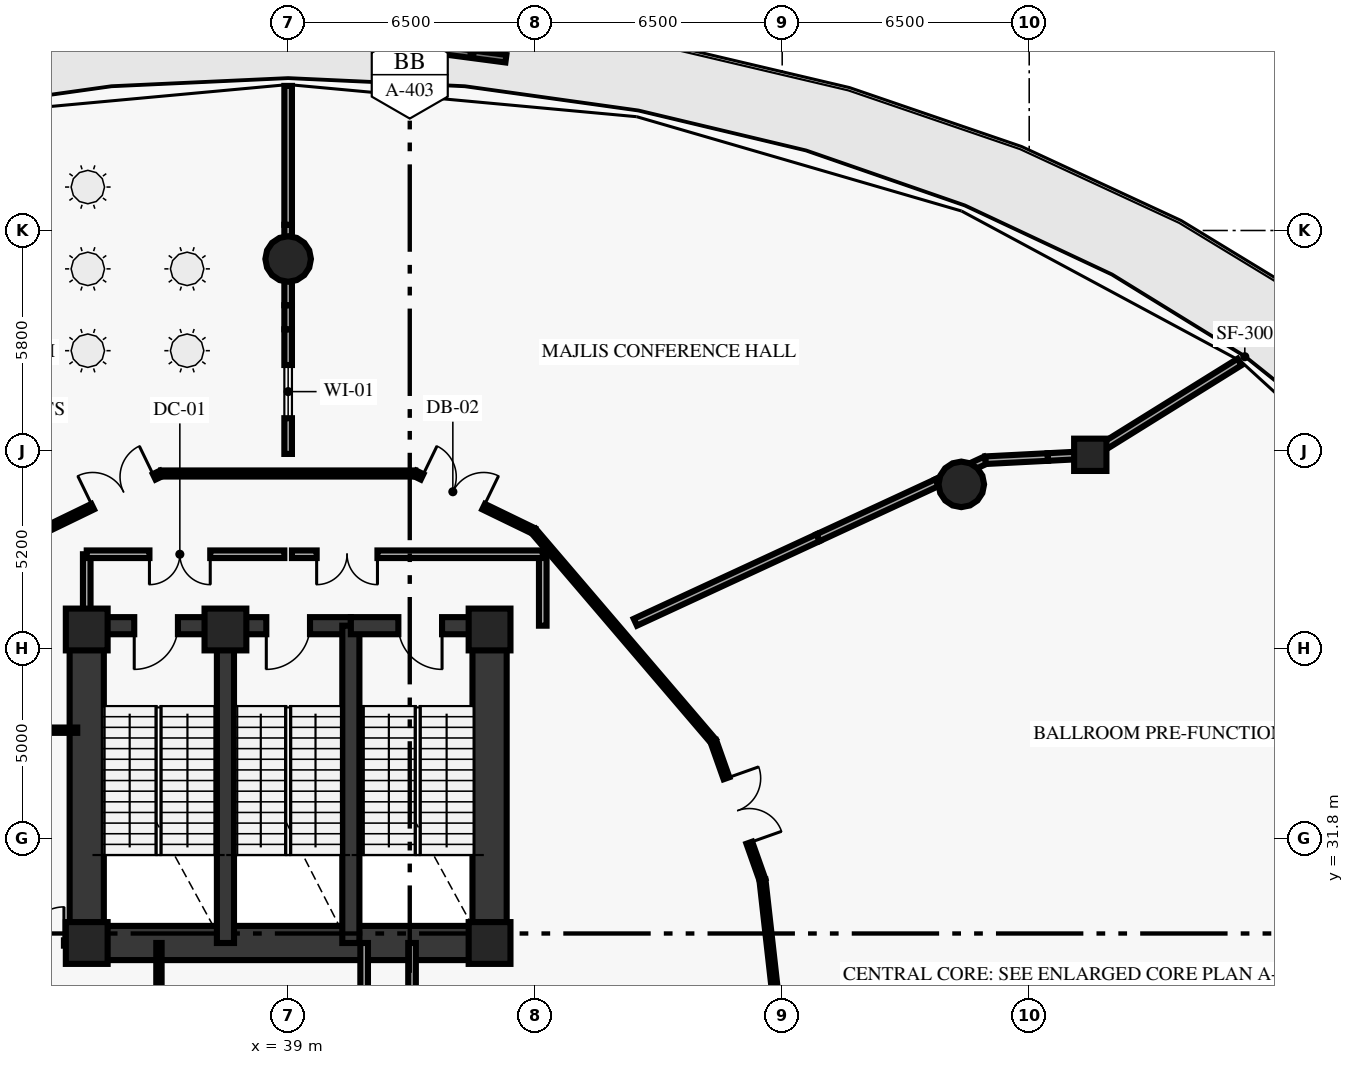
"""IFC4 building model, lengths in metres.
Left out: names, types, materials, properties, quantities, classifications, styles, units other than length and angle.
Written with IfcOpenShell. Run it as: python <this file> out.ifc"""

import sys

from ifc_helpers import new_model, si_unit, direction, frame, frame_2d, origin, origin_2d, place, context, subcontext, project, spatial, rectangle, circle, extrude, element, fill, save


model = new_model("IFC4")
c1 = context("Model", 3, precision=1e-05, world=origin(), true_north=direction((0.0, 1.0)))
c2 = subcontext(c1, "Body", "Model", "MODEL_VIEW")
j1 = project(units=[si_unit("LENGTHUNIT", "METRE"), si_unit("PLANEANGLEUNIT", "RADIAN")], contexts=[c1])
p1 = place(None, origin())
s1 = spatial("IfcSite", under=j1, at=p1, CompositionType="ELEMENT")
p2 = place(p1, origin())
s2 = spatial("IfcBuilding", under=s1, at=p2, CompositionType="ELEMENT")
p3 = place(p2, frame((0.0, 0.0, 11.0)))
s3 = spatial("IfcBuildingStorey", under=s2, at=p3, CompositionType="ELEMENT", Elevation=11.0)
for number, where, z_axis, x_axis in (
    (1, (44.3, 29.05, 0.0), (0.0, 0.0, 1.0), (1.0, 0.0, 0.0)),
    (2, (44.3, 37.3, 0.0), (0.0, 0.0, 1.0), (1.0, 0.0, 0.0)),
    (3, (37.35, 37.3, 0.0), (0.0, 0.0, 1.0), (1.0, 0.0, 0.0)),
    (4, (33.7, 37.3, 0.0), (0.0, 0.0, 1.0), (1.0, 0.0, 0.0)),
    (5, (33.7, 29.05, 0.0), (0.0, 0.0, 1.0), (1.0, 0.0, 0.0)),
):
    element("IfcColumn", number, at=place(p3, frame(where, z_axis=z_axis, x_axis=x_axis)), inside=s3, PredefinedType="PILASTER", context=c2, shape_type="SweptSolid", body=[
        extrude(rectangle(XDim=1.1, YDim=1.1, at=origin_2d()), origin(), (0.0, 0.0, 1.0), 4.7),
    ])
for number, where, z_axis, x_axis in (
    (6, (56.713, 41.119, 0.0), (0.0, 0.0, 1.0), (1.0, 0.0, 0.0)),
    (7, (39.0, 47.05, 0.0), (0.0, 0.0, 1.0), (1.0, 0.0, 0.0)),
):
    element("IfcColumn", number, at=place(p3, frame(where, z_axis=z_axis, x_axis=x_axis)), inside=s3, PredefinedType="COLUMN", context=c2, shape_type="SweptSolid", body=[
        extrude(circle(Radius=0.6, at=origin_2d()), origin(), (0.0, 0.0, 1.0), 4.7),
    ])
p4 = place(p3, frame((60.107, 41.897, 0.0), z_axis=(0.0, 0.0, 1.0), x_axis=(1.0, 0.0, 0.0)))
e8 = element("IfcColumn", 8, at=p4, inside=s3, PredefinedType="COLUMN", context=c2, shape_type="SweptSolid", body=[
    extrude(rectangle(XDim=0.85, YDim=0.85, at=origin_2d()), origin(), (0.0, 0.0, 1.0), 4.7),
])
for number, where, z_axis, x_axis in (
    (9, (33.7, 29.05, 0.0), (0.0, 0.0, 1.0), (0.0, 1.0, 0.0)),
    (10, (44.3, 29.05, 0.0), (0.0, 0.0, 1.0), (0.0, 1.0, 0.0)),
):
    element("IfcWall", number, at=place(p3, frame(where, z_axis=z_axis, x_axis=x_axis)), inside=s3, PredefinedType="SHEAR", context=c2, shape_type="SweptSolid", body=[
        extrude(rectangle(XDim=8.35, YDim=0.9, at=frame_2d((4.175, 0.0))), origin(), (0.0, 0.0, 1.0), 4.7),
    ])
p5 = place(p3, frame((33.7, 29.05, 0.0), z_axis=(0.0, 0.0, 1.0), x_axis=(1.0, 0.0, 0.0)))
e11 = element("IfcWall", 11, at=p5, inside=s3, PredefinedType="SHEAR", context=c2, shape_type="SweptSolid", body=[
    extrude(rectangle(XDim=10.6, YDim=0.9, at=frame_2d((5.3, 0.0))), origin(), (0.0, 0.0, 1.0), 4.7),
])
p6 = place(p3, frame((42.945, 52.556, 0.0), z_axis=(0.0, 0.0, 1.0), x_axis=(0.99145383396, -0.130458020554, 0.0)))
e12 = element("IfcWall", 12, at=p6, inside=s3, PredefinedType="ELEMENTEDWALL", context=c2, shape_type="SweptSolid", body=[
    extrude(rectangle(XDim=1.8, YDim=0.2, at=frame_2d((0.9, 0.0))), origin(), (0.0, 0.0, 1.0), 0.65),
])
p7 = place(p3, frame((37.35, 37.4, 0.0), z_axis=(0.0, 0.0, 1.0), x_axis=(-1.0, 0.0, 0.0)))
e13 = element("IfcWall", 13, at=p7, inside=s3, PredefinedType="SHEAR", context=c2, shape_type="SweptSolid", body=[
    extrude(rectangle(XDim=3.65, YDim=0.45, at=frame_2d((1.825, 0.0))), origin(), (0.0, 0.0, 1.0), 4.7),
])
p8 = place(p7, frame((1.25, 0.0, 0.0)))
e14 = element("IfcOpeningElement", 14, at=p8, cuts=e13, PredefinedType="OPENING", context=c2, shape_type="SweptSolid", body=[
    extrude(rectangle(XDim=1.15, YDim=2.15, at=frame_2d((0.575, 1.075))), frame((0.0, 0.235, 0.0), z_axis=(0.0, -1.0, 0.0), x_axis=(1.0, 0.0, 0.0)), (0.0, 0.0, 1.0), 0.47),
])
p9 = place(p3, frame((37.35, 29.05, 0.0), z_axis=(0.0, 0.0, 1.0), x_axis=(0.0, 1.0, 0.0)))
e15 = element("IfcWall", 15, at=p9, inside=s3, PredefinedType="SHEAR", context=c2, shape_type="SweptSolid", body=[
    extrude(rectangle(XDim=8.35, YDim=0.45, at=frame_2d((4.175, 0.0))), origin(), (0.0, 0.0, 1.0), 4.7),
])
p10 = place(p3, frame((40.65, 37.4, 0.0), z_axis=(0.0, 0.0, 1.0), x_axis=(-1.0, 0.0, 0.0)))
e16 = element("IfcWall", 16, at=p10, inside=s3, PredefinedType="SHEAR", context=c2, shape_type="SweptSolid", body=[
    extrude(rectangle(XDim=3.3, YDim=0.45, at=frame_2d((1.65, 0.0))), origin(), (0.0, 0.0, 1.0), 4.7),
])
p11 = place(p10, frame((1.075, 0.0, 0.0)))
e17 = element("IfcOpeningElement", 17, at=p11, cuts=e16, PredefinedType="OPENING", context=c2, shape_type="SweptSolid", body=[
    extrude(rectangle(XDim=1.15, YDim=2.15, at=frame_2d((0.575, 1.075))), frame((0.0, 0.235, 0.0), z_axis=(0.0, -1.0, 0.0), x_axis=(1.0, 0.0, 0.0)), (0.0, 0.0, 1.0), 0.47),
])
p12 = place(p3, frame((40.65, 29.05, 0.0), z_axis=(0.0, 0.0, 1.0), x_axis=(0.0, 1.0, 0.0)))
e18 = element("IfcWall", 18, at=p12, inside=s3, PredefinedType="SHEAR", context=c2, shape_type="SweptSolid", body=[
    extrude(rectangle(XDim=8.35, YDim=0.45, at=frame_2d((4.175, 0.0))), origin(), (0.0, 0.0, 1.0), 4.7),
])
p13 = place(p3, frame((44.3, 37.4, 0.0), z_axis=(0.0, 0.0, 1.0), x_axis=(-1.0, 0.0, 0.0)))
e19 = element("IfcWall", 19, at=p13, inside=s3, PredefinedType="SHEAR", context=c2, shape_type="SweptSolid", body=[
    extrude(rectangle(XDim=3.65, YDim=0.45, at=frame_2d((1.825, 0.0))), origin(), (0.0, 0.0, 1.0), 4.7),
])
p14 = place(p13, frame((1.25, 0.0, 0.0)))
e20 = element("IfcOpeningElement", 20, at=p14, cuts=e19, PredefinedType="OPENING", context=c2, shape_type="SweptSolid", body=[
    extrude(rectangle(XDim=1.15, YDim=2.15, at=frame_2d((0.575, 1.075))), frame((0.0, 0.235, 0.0), z_axis=(0.0, -1.0, 0.0), x_axis=(1.0, 0.0, 0.0)), (0.0, 0.0, 1.0), 0.47),
])
for number, where, z_axis, x_axis in (
    (21, (33.7, 37.4, 0.0), (0.0, 0.0, 1.0), (0.0, 1.0, 0.0)),
    (22, (45.7, 37.4, 0.0), (0.0, 0.0, 1.0), (0.0, 1.0, 0.0)),
):
    element("IfcWall", number, at=place(p3, frame(where, z_axis=z_axis, x_axis=x_axis)), inside=s3, PredefinedType="SOLIDWALL", context=c2, shape_type="SweptSolid", body=[
        extrude(rectangle(XDim=1.88, YDim=0.2, at=frame_2d((0.94, 0.0))), origin(), (0.0, 0.0, 1.0), 4.7),
    ])
p15 = place(p3, frame((38.9, 39.28, 0.0), z_axis=(0.0, 0.0, 1.0), x_axis=(-1.0, 0.0, 0.0)))
e23 = element("IfcWall", 23, at=p15, inside=s3, PredefinedType="SOLIDWALL", context=c2, shape_type="SweptSolid", body=[
    extrude(rectangle(XDim=5.2, YDim=0.2, at=frame_2d((2.6, 0.0))), origin(), (0.0, 0.0, 1.0), 4.7),
])
p16 = place(p15, frame((1.95, 0.0, 0.0)))
e24 = element("IfcOpeningElement", 24, at=p16, cuts=e23, PredefinedType="OPENING", context=c2, shape_type="SweptSolid", body=[
    extrude(rectangle(XDim=1.6, YDim=2.2, at=frame_2d((0.8, 1.1))), frame((0.0, 0.11, 0.0), z_axis=(0.0, -1.0, 0.0), x_axis=(1.0, 0.0, 0.0)), (0.0, 0.0, 1.0), 0.22),
])
p17 = place(p3, frame((45.7, 39.28, 0.0), z_axis=(0.0, 0.0, 1.0), x_axis=(-1.0, 0.0, 0.0)))
e25 = element("IfcWall", 25, at=p17, inside=s3, PredefinedType="SOLIDWALL", context=c2, shape_type="SweptSolid", body=[
    extrude(rectangle(XDim=6.6, YDim=0.2, at=frame_2d((3.3, 0.0))), origin(), (0.0, 0.0, 1.0), 4.7),
])
p18 = place(p17, frame((4.35, 0.0, 0.0)))
e26 = element("IfcOpeningElement", 26, at=p18, cuts=e25, PredefinedType="OPENING", context=c2, shape_type="SweptSolid", body=[
    extrude(rectangle(XDim=1.6, YDim=2.2, at=frame_2d((0.8, 1.1))), frame((0.0, 0.11, 0.0), z_axis=(0.0, -1.0, 0.0), x_axis=(1.0, 0.0, 0.0)), (0.0, 0.0, 1.0), 0.22),
])
p19 = place(p3, frame((35.6, 27.28, 0.0), z_axis=(0.0, 0.0, 1.0), x_axis=(0.0, 1.0, 0.0)))
e27 = element("IfcWall", 27, at=p19, inside=s3, PredefinedType="PARTITIONING", context=c2, shape_type="SweptSolid", body=[
    extrude(rectangle(XDim=1.77, YDim=0.14, at=frame_2d((0.885, 0.0))), origin(), (0.0, 0.0, 1.0), 4.7),
])
for number, where, z_axis, x_axis in (
    (28, (41.0, 27.28, 0.0), (0.0, 0.0, 1.0), (0.0, 1.0, 0.0)),
    (29, (42.26, 27.28, 0.0), (0.0, 0.0, 1.0), (0.0, 1.0, 0.0)),
):
    element("IfcWall", number, at=place(p3, frame(where, z_axis=z_axis, x_axis=x_axis)), inside=s3, PredefinedType="SOLIDWALL", context=c2, shape_type="SweptSolid", body=[
        extrude(rectangle(XDim=1.77, YDim=0.2, at=frame_2d((0.885, 0.0))), origin(), (0.0, 0.0, 1.0), 4.7),
    ])
p20 = place(p3, frame((30.85, 29.05, 0.0), z_axis=(0.0, 0.0, 1.0), x_axis=(1.0, 0.0, 0.0)))
e30 = element("IfcWall", 30, at=p20, inside=s3, PredefinedType="PARTITIONING", context=c2, shape_type="SweptSolid", body=[
    extrude(rectangle(XDim=2.43, YDim=0.14, at=frame_2d((1.215, 0.0))), origin(), (0.0, 0.0, 1.0), 3.66),
])
p21 = place(p20, frame((0.14, 0.0, 0.0)))
e31 = element("IfcOpeningElement", 31, at=p21, cuts=e30, PredefinedType="OPENING", context=c2, shape_type="SweptSolid", body=[
    extrude(rectangle(XDim=0.85, YDim=2.1, at=frame_2d((0.425, 1.05))), frame((0.0, 0.08, 0.0), z_axis=(0.0, -1.0, 0.0), x_axis=(1.0, 0.0, 0.0)), (0.0, 0.0, 1.0), 0.16),
])
p22 = place(p20, frame((1.3, 0.0, 0.0)))
e32 = element("IfcOpeningElement", 32, at=p22, cuts=e30, PredefinedType="OPENING", context=c2, shape_type="SweptSolid", body=[
    extrude(rectangle(XDim=0.95, YDim=2.1, at=frame_2d((0.475, 1.05))), frame((0.0, 0.08, 0.0), z_axis=(0.0, -1.0, 0.0), x_axis=(1.0, 0.0, 0.0)), (0.0, 0.0, 1.0), 0.16),
])
p23 = place(p3, frame((30.85, 34.65, 0.0), z_axis=(0.0, 0.0, 1.0), x_axis=(1.0, 0.0, 0.0)))
e33 = element("IfcWall", 33, at=p23, inside=s3, PredefinedType="PARTITIONING", context=c2, shape_type="SweptSolid", body=[
    extrude(rectangle(XDim=2.6, YDim=0.14, at=frame_2d((1.3, 0.0))), origin(), (0.0, 0.0, 1.0), 4.7),
])
p24 = place(p3, frame((51.92, 26.8, 0.0), z_axis=(0.0, 0.0, 1.0), x_axis=(-0.111731247657, 0.993738460711, 0.0)))
e34 = element("IfcWall", 34, at=p24, inside=s3, PredefinedType="PARTITIONING", context=c2, shape_type="SweptSolid", body=[
    extrude(rectangle(XDim=3.938, YDim=0.16, at=frame_2d((1.969, 0.0))), origin(), (0.0, 0.0, 1.0), 4.7),
])
p25 = place(p3, frame((50.189, 34.36, 0.0), z_axis=(0.0, 0.0, 1.0), x_axis=(0.333684770033, -0.942684716248, 0.0)))
e35 = element("IfcWall", 35, at=p25, inside=s3, PredefinedType="PARTITIONING", context=c2, shape_type="SweptSolid", body=[
    extrude(rectangle(XDim=3.869, YDim=0.16, at=frame_2d((1.935, 0.0))), origin(), (0.0, 0.0, 1.0), 4.7),
])
p26 = place(p25, frame((1.034, 0.0, 0.0)))
e36 = element("IfcOpeningElement", 36, at=p26, cuts=e35, PredefinedType="OPENING", context=c2, shape_type="SweptSolid", body=[
    extrude(rectangle(XDim=1.8, YDim=2.3, at=frame_2d((0.9, 1.15))), frame((0.0, 0.09, 0.0), z_axis=(0.0, -1.0, 0.0), x_axis=(1.0, 0.0, 0.0)), (0.0, 0.0, 1.0), 0.18),
])
p27 = place(p3, frame((50.189, 34.36, 0.0), z_axis=(0.0, 0.0, 1.0), x_axis=(-0.649652680018, 0.760231145998, 0.0)))
e37 = element("IfcWall", 37, at=p27, inside=s3, PredefinedType="PARTITIONING", context=c2, shape_type="SweptSolid", body=[
    extrude(rectangle(XDim=7.279, YDim=0.16, at=frame_2d((3.64, 0.0))), origin(), (0.0, 0.0, 1.0), 4.7),
])
p28 = place(p3, frame((42.344, 41.405, 0.0), z_axis=(0.0, 0.0, 1.0), x_axis=(0.899789784655, -0.436323668199, 0.0)))
e38 = element("IfcWall", 38, at=p28, inside=s3, PredefinedType="PARTITIONING", context=c2, shape_type="SweptSolid", body=[
    extrude(rectangle(XDim=3.463, YDim=0.16, at=frame_2d((1.731, 0.0))), origin(), (0.0, 0.0, 1.0), 4.7),
])
p29 = place(p28, frame((0.2, 0.0, 0.0)))
e39 = element("IfcOpeningElement", 39, at=p29, cuts=e38, PredefinedType="OPENING", context=c2, shape_type="SweptSolid", body=[
    extrude(rectangle(XDim=1.8, YDim=2.3, at=frame_2d((0.9, 1.15))), frame((0.0, 0.09, 0.0), z_axis=(0.0, -1.0, 0.0), x_axis=(1.0, 0.0, 0.0)), (0.0, 0.0, 1.0), 0.18),
])
p30 = place(p3, frame((42.344, 41.405, 0.0), z_axis=(0.0, 0.0, 1.0), x_axis=(-1.0, 0.0, 0.0)))
e40 = element("IfcWall", 40, at=p30, inside=s3, PredefinedType="PARTITIONING", context=c2, shape_type="SweptSolid", body=[
    extrude(rectangle(XDim=6.688, YDim=0.16, at=frame_2d((3.344, 0.0))), origin(), (0.0, 0.0, 1.0), 4.7),
])
p31 = place(p3, frame((32.54, 39.894, 0.0), z_axis=(0.0, 0.0, 1.0), x_axis=(0.899789784655, 0.436323668199, 0.0)))
e41 = element("IfcWall", 41, at=p31, inside=s3, PredefinedType="PARTITIONING", context=c2, shape_type="SweptSolid", body=[
    extrude(rectangle(XDim=3.463, YDim=0.16, at=frame_2d((1.731, 0.0))), origin(), (0.0, 0.0, 1.0), 4.7),
])
p32 = place(p31, frame((1.463, 0.0, 0.0)))
e42 = element("IfcOpeningElement", 42, at=p32, cuts=e41, PredefinedType="OPENING", context=c2, shape_type="SweptSolid", body=[
    extrude(rectangle(XDim=1.8, YDim=2.3, at=frame_2d((0.9, 1.15))), frame((0.0, 0.09, 0.0), z_axis=(0.0, -1.0, 0.0), x_axis=(1.0, 0.0, 0.0)), (0.0, 0.0, 1.0), 0.18),
])
p33 = place(p3, frame((48.136, 37.491, 0.0), z_axis=(0.0, 0.0, 1.0), x_axis=(0.907524785669, 0.419998527851, 0.0)))
e43 = element("IfcWall", 43, at=p33, inside=s3, PredefinedType="PARTITIONING", context=c2, shape_type="SweptSolid", body=[
    extrude(rectangle(XDim=5.3, YDim=0.2, at=frame_2d((2.65, 0.0))), origin(), (0.0, 0.0, 1.0), 4.7),
])
p34 = place(p3, frame((52.946, 39.717, 0.0), z_axis=(0.0, 0.0, 1.0), x_axis=(0.90747190463, 0.420112773321, 0.0)))
e44 = element("IfcWall", 44, at=p34, inside=s3, PredefinedType="PARTITIONING", context=c2, shape_type="SweptSolid", body=[
    extrude(rectangle(XDim=3.449, YDim=0.2, at=frame_2d((1.725, 0.0))), origin(), (0.0, 0.0, 1.0), 3.92),
])
p35 = place(p3, frame((56.076, 41.166, 0.0), z_axis=(0.0, 0.0, 1.0), x_axis=(0.907622896373, 0.419786467124, 0.0)))
e45 = element("IfcWall", 45, at=p35, inside=s3, PredefinedType="PARTITIONING", context=c2, shape_type="SweptSolid", body=[
    extrude(rectangle(XDim=1.403, YDim=0.2, at=frame_2d((0.701, 0.0))), origin(), (0.0, 0.0, 1.0), 4.7),
])
p36 = place(p3, frame((57.349, 41.755, 0.0), z_axis=(0.0, 0.0, 1.0), x_axis=(0.998685128887, 0.051264152576, 0.0)))
e46 = element("IfcWall", 46, at=p36, inside=s3, PredefinedType="PARTITIONING", context=c2, shape_type="SweptSolid", body=[
    extrude(rectangle(XDim=1.643, YDim=0.2, at=frame_2d((0.822, 0.0))), origin(), (0.0, 0.0, 1.0), 4.7),
])
p37 = place(p3, frame((58.99, 41.839, 0.0), z_axis=(0.0, 0.0, 1.0), x_axis=(0.998660904733, 0.051733909163, 0.0)))
e47 = element("IfcWall", 47, at=p37, inside=s3, PredefinedType="PARTITIONING", context=c2, shape_type="SweptSolid", body=[
    extrude(rectangle(XDim=1.118, YDim=0.2, at=frame_2d((0.559, 0.0))), origin(), (0.0, 0.0, 1.0), 4.24),
])
p38 = place(p3, frame((60.107, 41.897, 0.0), z_axis=(0.0, 0.0, 1.0), x_axis=(0.849149708827, 0.528152224267, 0.0)))
e48 = element("IfcWall", 48, at=p38, inside=s3, PredefinedType="PARTITIONING", context=c2, shape_type="SweptSolid", body=[
    extrude(rectangle(XDim=4.626, YDim=0.2, at=frame_2d((2.313, 0.0))), origin(), (0.0, 0.0, 1.0), 4.7),
])
p39 = place(p3, frame((39.0, 41.92, 0.0), z_axis=(0.0, 0.0, 1.0), x_axis=(0.0, 1.0, 0.0)))
e49 = element("IfcWall", 49, at=p39, inside=s3, PredefinedType="SOLIDWALL", context=c2, shape_type="SweptSolid", body=[
    extrude(rectangle(XDim=3.28, YDim=0.2, at=frame_2d((1.64, 0.0))), origin(), (0.0, 0.0, 1.0), 4.7),
])
p40 = place(p39, frame((0.94, 0.0, 1.0)))
e50 = element("IfcOpeningElement", 50, at=p40, cuts=e49, PredefinedType="OPENING", context=c2, shape_type="SweptSolid", body=[
    extrude(rectangle(XDim=1.4, YDim=1.2, at=frame_2d((0.7, 0.6))), frame((0.0, 0.11, 0.0), z_axis=(0.0, -1.0, 0.0), x_axis=(1.0, 0.0, 0.0)), (0.0, 0.0, 1.0), 0.22),
])
p41 = place(p3, frame((39.0, 45.2, 0.0), z_axis=(0.0, 0.0, 1.0), x_axis=(0.0, 1.0, 0.0)))
e51 = element("IfcWall", 51, at=p41, inside=s3, PredefinedType="SOLIDWALL", context=c2, shape_type="SweptSolid", body=[
    extrude(rectangle(XDim=0.633, YDim=0.2, at=frame_2d((0.316, 0.0))), origin(), (0.0, 0.0, 1.0), 4.7),
])
p42 = place(p3, frame((39.0, 45.833, 0.0), z_axis=(0.0, 0.0, 1.0), x_axis=(0.0, 1.0, 0.0)))
e52 = element("IfcWall", 52, at=p42, inside=s3, PredefinedType="SOLIDWALL", context=c2, shape_type="SweptSolid", body=[
    extrude(rectangle(XDim=1.234, YDim=0.2, at=frame_2d((0.617, 0.0))), origin(), (0.0, 0.0, 1.0), 4.165),
])
p43 = place(p3, frame((39.0, 47.067, 0.0), z_axis=(0.0, 0.0, 1.0), x_axis=(0.0, 1.0, 0.0)))
e53 = element("IfcWall", 53, at=p43, inside=s3, PredefinedType="SOLIDWALL", context=c2, shape_type="SweptSolid", body=[
    extrude(rectangle(XDim=0.883, YDim=0.2, at=frame_2d((0.441, 0.0))), origin(), (0.0, 0.0, 1.0), 4.7),
])
p44 = place(p3, frame((39.0, 47.95, 0.0), z_axis=(0.0, 0.0, 1.0), x_axis=(0.0, 1.0, 0.0)))
e54 = element("IfcWall", 54, at=p44, inside=s3, PredefinedType="SOLIDWALL", context=c2, shape_type="SweptSolid", body=[
    extrude(rectangle(XDim=3.655, YDim=0.2, at=frame_2d((1.828, 0.0))), origin(), (0.0, 0.0, 1.0), 4.7),
])
p45 = place(p8, origin())
e55 = element("IfcDoor", 55, at=p45, inside=s3, OperationType="SINGLE_SWING_RIGHT", PredefinedType="DOOR", context=c2, shape_type="SweptSolid", body=[
    extrude(rectangle(XDim=1.15, YDim=2.15, at=frame_2d((0.575, 1.075))), frame((0.0, 0.025, 0.0), z_axis=(0.0, -1.0, 0.0), x_axis=(1.0, 0.0, 0.0)), (0.0, 0.0, 1.0), 0.05),
])
fill(e14, e55)
p46 = place(p11, origin())
e56 = element("IfcDoor", 56, at=p46, inside=s3, OperationType="SINGLE_SWING_RIGHT", PredefinedType="DOOR", context=c2, shape_type="SweptSolid", body=[
    extrude(rectangle(XDim=1.15, YDim=2.15, at=frame_2d((0.575, 1.075))), frame((0.0, 0.025, 0.0), z_axis=(0.0, -1.0, 0.0), x_axis=(1.0, 0.0, 0.0)), (0.0, 0.0, 1.0), 0.05),
])
fill(e17, e56)
p47 = place(p14, origin())
e57 = element("IfcDoor", 57, at=p47, inside=s3, OperationType="SINGLE_SWING_LEFT", PredefinedType="DOOR", context=c2, shape_type="SweptSolid", body=[
    extrude(rectangle(XDim=1.15, YDim=2.15, at=frame_2d((0.575, 1.075))), frame((0.0, 0.025, 0.0), z_axis=(0.0, -1.0, 0.0), x_axis=(1.0, 0.0, 0.0)), (0.0, 0.0, 1.0), 0.05),
])
fill(e20, e57)
p48 = place(p16, origin())
e58 = element("IfcDoor", 58, at=p48, inside=s3, OperationType="DOUBLE_DOOR_SINGLE_SWING", PredefinedType="DOOR", context=c2, shape_type="SweptSolid", body=[
    extrude(rectangle(XDim=1.6, YDim=2.2, at=frame_2d((0.8, 1.1))), frame((0.0, 0.025, 0.0), z_axis=(0.0, -1.0, 0.0), x_axis=(1.0, 0.0, 0.0)), (0.0, 0.0, 1.0), 0.05),
])
fill(e24, e58)
p49 = place(p18, origin())
e59 = element("IfcDoor", 59, at=p49, inside=s3, OperationType="DOUBLE_DOOR_SINGLE_SWING", PredefinedType="DOOR", context=c2, shape_type="SweptSolid", body=[
    extrude(rectangle(XDim=1.6, YDim=2.2, at=frame_2d((0.8, 1.1))), frame((0.0, 0.025, 0.0), z_axis=(0.0, -1.0, 0.0), x_axis=(1.0, 0.0, 0.0)), (0.0, 0.0, 1.0), 0.05),
])
fill(e26, e59)
p50 = place(p22, origin())
e60 = element("IfcDoor", 60, at=p50, inside=s3, OperationType="SINGLE_SWING_RIGHT", PredefinedType="DOOR", context=c2, shape_type="SweptSolid", body=[
    extrude(rectangle(XDim=0.95, YDim=2.1, at=frame_2d((0.475, 1.05))), frame((0.0, 0.025, 0.0), z_axis=(0.0, -1.0, 0.0), x_axis=(1.0, 0.0, 0.0)), (0.0, 0.0, 1.0), 0.05),
])
fill(e32, e60)
p51 = place(p26, origin())
e61 = element("IfcDoor", 61, at=p51, inside=s3, OperationType="DOUBLE_DOOR_SINGLE_SWING", PredefinedType="DOOR", context=c2, shape_type="SweptSolid", body=[
    extrude(rectangle(XDim=1.8, YDim=2.3, at=frame_2d((0.9, 1.15))), frame((0.0, 0.025, 0.0), z_axis=(0.0, -1.0, 0.0), x_axis=(1.0, 0.0, 0.0)), (0.0, 0.0, 1.0), 0.05),
])
fill(e36, e61)
p52 = place(p29, origin())
e62 = element("IfcDoor", 62, at=p52, inside=s3, OperationType="DOUBLE_DOOR_SINGLE_SWING", PredefinedType="DOOR", context=c2, shape_type="SweptSolid", body=[
    extrude(rectangle(XDim=1.8, YDim=2.3, at=frame_2d((0.9, 1.15))), frame((0.0, 0.025, 0.0), z_axis=(0.0, -1.0, 0.0), x_axis=(1.0, 0.0, 0.0)), (0.0, 0.0, 1.0), 0.05),
])
fill(e39, e62)
p53 = place(p32, origin())
e63 = element("IfcDoor", 63, at=p53, inside=s3, OperationType="DOUBLE_DOOR_SINGLE_SWING", PredefinedType="DOOR", context=c2, shape_type="SweptSolid", body=[
    extrude(rectangle(XDim=1.8, YDim=2.3, at=frame_2d((0.9, 1.15))), frame((0.0, 0.025, 0.0), z_axis=(0.0, -1.0, 0.0), x_axis=(1.0, 0.0, 0.0)), (0.0, 0.0, 1.0), 0.05),
])
fill(e42, e63)
p54 = place(p40, origin())
e64 = element("IfcWindow", 64, at=p54, inside=s3, PartitioningType="SINGLE_PANEL", PredefinedType="WINDOW", context=c2, shape_type="SweptSolid", body=[
    extrude(rectangle(XDim=1.4, YDim=1.2, at=frame_2d((0.7, 0.6))), frame((0.0, 0.03, 0.0), z_axis=(0.0, -1.0, 0.0), x_axis=(1.0, 0.0, 0.0)), (0.0, 0.0, 1.0), 0.06),
])
fill(e50, e64)
save(model, sys.argv[1])
